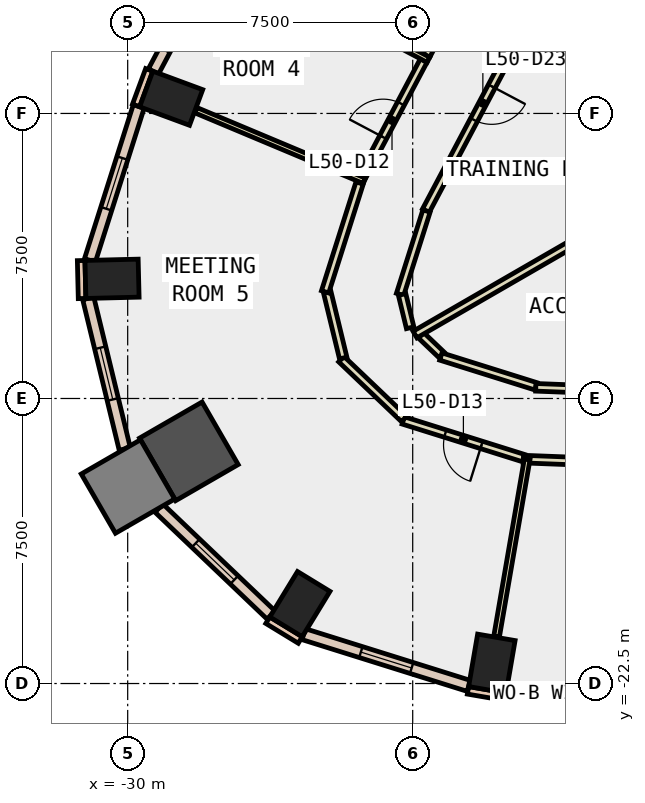
"""IFC4 building model, lengths in metres.
Left out: names, types, materials, properties, quantities, classifications, styles, units other than length and angle.
Written with IfcOpenShell. Run it as: python <this file> out.ifc"""

import sys

from ifc_helpers import new_model, si_unit, direction, frame, frame_2d, origin, origin_2d, place, context, subcontext, project, spatial, rectangle, extrude, element, fill, save


model = new_model("IFC4")
c1 = context("Model", 3, precision=1e-05, world=origin(), true_north=direction((0.0, 1.0)))
c2 = subcontext(c1, "Body", "Model", "MODEL_VIEW")
j1 = project(units=[si_unit("LENGTHUNIT", "METRE"), si_unit("PLANEANGLEUNIT", "RADIAN")], contexts=[c1])
p1 = place(None, origin())
s1 = spatial("IfcSite", under=j1, at=p1, CompositionType="ELEMENT")
p2 = place(p1, origin())
s2 = spatial("IfcBuilding", under=s1, at=p2, CompositionType="ELEMENT")
p3 = place(p2, frame((0.0, 0.0, 223.4)))
s3 = spatial("IfcBuildingStorey", under=s2, at=p3, CompositionType="ELEMENT", Elevation=223.4)
for number, where, z_axis, x_axis in (
    (1, (-20.417, -21.975, -0.4), (0.0, 0.0, 1.0), (-0.986, 0.169, 0.0)),
    (2, (-28.856, -7.1, -0.4), (0.0, 0.0, 1.0), (0.347, 0.938, 0.0)),
    (3, (-30.412, -11.851, -0.4), (0.0, 0.0, 1.0), (-0.025, 1.0, 0.0)),
):
    element("IfcColumn", number, at=place(p3, frame(where, z_axis=z_axis, x_axis=x_axis)), inside=s3, PredefinedType="COLUMN", context=c2, shape_type="SweptSolid", body=[
        extrude(rectangle(XDim=1.0, YDim=1.4, at=origin_2d()), origin(), (0.0, 0.0, 1.0), 4.2),
    ])
p4 = place(p3, frame((-28.39, -16.391, -0.4), z_axis=(0.0, 0.0, 1.0), x_axis=(0.866025403784, 0.5, 0.0)))
e4 = element("IfcColumn", 4, at=p4, inside=s3, PredefinedType="COLUMN", context=c2, shape_type="SweptSolid", body=[
    extrude(rectangle(XDim=1.9, YDim=1.9, at=origin_2d()), origin(), (0.0, 0.0, 1.0), 4.2),
])
p5 = place(p3, frame((-25.469, -20.412, -0.4), z_axis=(0.0, 0.0, 1.0), x_axis=(-0.853423465127, 0.521218178089, 0.0)))
e5 = element("IfcColumn", 5, at=p5, inside=s3, PredefinedType="COLUMN", context=c2, shape_type="SweptSolid", body=[
    extrude(rectangle(XDim=1.0, YDim=1.4, at=origin_2d()), origin(), (0.0, 0.0, 1.0), 4.2),
])
p6 = place(p3, frame((-29.992, -17.316, -0.4), z_axis=(0.0, 0.0, 1.0), x_axis=(0.866025403784, 0.5, 0.0)))
e6 = element("IfcColumn", 6, at=p6, inside=s3, PredefinedType="COLUMN", context=c2, shape_type="SweptSolid", body=[
    extrude(rectangle(XDim=1.8, YDim=1.8, at=origin_2d()), origin(), (0.0, 0.0, 1.0), 4.2),
])
p7 = place(p3, frame((-29.433, -6.354, 0.0), z_axis=(0.0, 0.0, 1.0), x_axis=(-0.346892928577, -0.937904737222, 0.0)))
e7 = element("IfcWall", 7, at=p7, inside=s3, PredefinedType="STANDARD", context=c2, shape_type="SweptSolid", body=[
    extrude(rectangle(XDim=1.0, YDim=0.2, at=frame_2d((0.5, 0.0))), origin(), (0.0, 0.0, 1.0), 3.8),
])
p8 = place(p3, frame((-21.045, -22.679, 0.0), z_axis=(0.0, 0.0, 1.0), x_axis=(0.985631544579, -0.168909615862, 0.0)))
e8 = element("IfcWall", 8, at=p8, inside=s3, PredefinedType="STANDARD", context=c2, shape_type="SweptSolid", body=[
    extrude(rectangle(XDim=1.0, YDim=0.2, at=frame_2d((0.5, 0.0))), origin(), (0.0, 0.0, 1.0), 3.8),
])
p9 = place(p3, frame((-31.224, -11.371, 0.0), z_axis=(0.0, 0.0, 1.0), x_axis=(0.024186470916, -0.999707464524, 0.0)))
e9 = element("IfcWall", 9, at=p9, inside=s3, PredefinedType="STANDARD", context=c2, shape_type="SweptSolid", body=[
    extrude(rectangle(XDim=0.999, YDim=0.2, at=frame_2d((0.5, 0.0))), origin(), (0.0, 0.0, 1.0), 3.8),
])
p10 = place(p3, frame((-26.313, -20.834, 0.0), z_axis=(0.0, 0.0, 1.0), x_axis=(0.853679739553, -0.520798331677, 0.0)))
e10 = element("IfcWall", 10, at=p10, inside=s3, PredefinedType="STANDARD", context=c2, shape_type="SweptSolid", body=[
    extrude(rectangle(XDim=1.0, YDim=0.2, at=frame_2d((0.5, 0.0))), origin(), (0.0, 0.0, 1.0), 3.8),
])
p11 = place(p3, frame((-20.04, -22.732, 0.0), z_axis=(0.0, 0.0, 1.0), x_axis=(0.99926218254, -0.038406907512, 0.0)))
e11 = element("IfcWall", 11, at=p11, inside=s3, PredefinedType="STANDARD", context=c2, shape_type="SweptSolid", body=[
    extrude(rectangle(XDim=5.365, YDim=0.3, at=frame_2d((2.683, 0.0))), origin(), (0.0, 0.0, 1.0), 3.8),
])
p12 = place(p11, frame((0.641, 0.0, 0.9)))
e12 = element("IfcOpeningElement", 12, at=p12, cuts=e11, PredefinedType="OPENING", context=c2, shape_type="SweptSolid", body=[
    extrude(rectangle(XDim=1.4, YDim=2.6, at=frame_2d((0.7, 1.3))), frame((0.0, 0.16, 0.0), z_axis=(0.0, -1.0, 0.0), x_axis=(1.0, 0.0, 0.0)), (0.0, 0.0, 1.0), 0.32),
])
p13 = place(p11, frame((3.324, 0.0, 0.9)))
e13 = element("IfcOpeningElement", 13, at=p13, cuts=e11, PredefinedType="OPENING", context=c2, shape_type="SweptSolid", body=[
    extrude(rectangle(XDim=1.4, YDim=2.6, at=frame_2d((0.7, 1.3))), frame((0.0, 0.16, 0.0), z_axis=(0.0, -1.0, 0.0), x_axis=(1.0, 0.0, 0.0)), (0.0, 0.0, 1.0), 0.32),
])
p14 = place(p3, frame((-25.887, 0.09, 0.0), z_axis=(0.0, 0.0, 1.0), x_axis=(-0.468020680141, -0.8837175131, 0.0)))
e14 = element("IfcWall", 14, at=p14, inside=s3, PredefinedType="STANDARD", context=c2, shape_type="SweptSolid", body=[
    extrude(rectangle(XDim=7.34, YDim=0.3, at=frame_2d((3.67, 0.0))), origin(), (0.0, 0.0, 1.0), 3.8),
])
p15 = place(p14, frame((0.635, 0.0, 0.9)))
e15 = element("IfcOpeningElement", 15, at=p15, cuts=e14, PredefinedType="OPENING", context=c2, shape_type="SweptSolid", body=[
    extrude(rectangle(XDim=2.4, YDim=2.6, at=frame_2d((1.2, 1.3))), frame((0.0, 0.16, 0.0), z_axis=(0.0, -1.0, 0.0), x_axis=(1.0, 0.0, 0.0)), (0.0, 0.0, 1.0), 0.32),
])
p16 = place(p14, frame((4.305, 0.0, 0.9)))
e16 = element("IfcOpeningElement", 16, at=p16, cuts=e14, PredefinedType="OPENING", context=c2, shape_type="SweptSolid", body=[
    extrude(rectangle(XDim=2.4, YDim=2.6, at=frame_2d((1.2, 1.3))), frame((0.0, 0.16, 0.0), z_axis=(0.0, -1.0, 0.0), x_axis=(1.0, 0.0, 0.0)), (0.0, 0.0, 1.0), 0.32),
])
p17 = place(p3, frame((-29.71, -7.316, 0.0), z_axis=(0.0, 0.0, 1.0), x_axis=(-0.302195467572, -0.953245980521, 0.0)))
e17 = element("IfcWall", 17, at=p17, inside=s3, PredefinedType="STANDARD", context=c2, shape_type="SweptSolid", body=[
    extrude(rectangle(XDim=4.249, YDim=0.3, at=frame_2d((2.125, 0.0))), origin(), (0.0, 0.0, 1.0), 3.8),
])
p18 = place(p17, frame((1.424, 0.0, 0.9)))
e18 = element("IfcOpeningElement", 18, at=p18, cuts=e17, PredefinedType="OPENING", context=c2, shape_type="SweptSolid", body=[
    extrude(rectangle(XDim=1.4, YDim=2.6, at=frame_2d((0.7, 1.3))), frame((0.0, 0.16, 0.0), z_axis=(0.0, -1.0, 0.0), x_axis=(1.0, 0.0, 0.0)), (0.0, 0.0, 1.0), 0.32),
])
p19 = place(p3, frame((-31.038, -12.365, 0.0), z_axis=(0.0, 0.0, 1.0), x_axis=(0.235766276378, -0.971809787419, 0.0)))
e19 = element("IfcWall", 19, at=p19, inside=s3, PredefinedType="STANDARD", context=c2, shape_type="SweptSolid", body=[
    extrude(rectangle(XDim=4.077, YDim=0.3, at=frame_2d((2.039, 0.0))), origin(), (0.0, 0.0, 1.0), 3.8),
])
p20 = place(p19, frame((1.338, 0.0, 0.9)))
e20 = element("IfcOpeningElement", 20, at=p20, cuts=e19, PredefinedType="OPENING", context=c2, shape_type="SweptSolid", body=[
    extrude(rectangle(XDim=1.4, YDim=2.6, at=frame_2d((0.7, 1.3))), frame((0.0, 0.16, 0.0), z_axis=(0.0, -1.0, 0.0), x_axis=(1.0, 0.0, 0.0)), (0.0, 0.0, 1.0), 0.32),
])
p21 = place(p3, frame((-29.178, -17.884, 0.0), z_axis=(0.0, 0.0, 1.0), x_axis=(0.723707630873, -0.69010670553, 0.0)))
e21 = element("IfcWall", 21, at=p21, inside=s3, PredefinedType="STANDARD", context=c2, shape_type="SweptSolid", body=[
    extrude(rectangle(XDim=4.076, YDim=0.3, at=frame_2d((2.038, 0.0))), origin(), (0.0, 0.0, 1.0), 3.8),
])
p22 = place(p21, frame((1.338, 0.0, 0.9)))
e22 = element("IfcOpeningElement", 22, at=p22, cuts=e21, PredefinedType="OPENING", context=c2, shape_type="SweptSolid", body=[
    extrude(rectangle(XDim=1.4, YDim=2.6, at=frame_2d((0.7, 1.3))), frame((0.0, 0.16, 0.0), z_axis=(0.0, -1.0, 0.0), x_axis=(1.0, 0.0, 0.0)), (0.0, 0.0, 1.0), 0.32),
])
p23 = place(p3, frame((-25.367, -21.202, 0.0), z_axis=(0.0, 0.0, 1.0), x_axis=(0.954297481837, -0.298858354675, 0.0)))
e23 = element("IfcWall", 23, at=p23, inside=s3, PredefinedType="STANDARD", context=c2, shape_type="SweptSolid", body=[
    extrude(rectangle(XDim=4.551, YDim=0.3, at=frame_2d((2.275, 0.0))), origin(), (0.0, 0.0, 1.0), 3.8),
])
p24 = place(p23, frame((1.575, 0.0, 0.9)))
e24 = element("IfcOpeningElement", 24, at=p24, cuts=e23, PredefinedType="OPENING", context=c2, shape_type="SweptSolid", body=[
    extrude(rectangle(XDim=1.4, YDim=2.6, at=frame_2d((0.7, 1.3))), frame((0.0, 0.16, 0.0), z_axis=(0.0, -1.0, 0.0), x_axis=(1.0, 0.0, 0.0)), (0.0, 0.0, 1.0), 0.32),
])
p25 = place(p3, frame((-19.154, -4.397, 0.0), z_axis=(0.0, 0.0, 1.0), x_axis=(-0.468118749105, -0.883665568378, 0.0)))
e25 = element("IfcWall", 25, at=p25, inside=s3, PredefinedType="PARTITIONING", context=c2, shape_type="SweptSolid", body=[
    extrude(rectangle(XDim=6.409, YDim=0.2, at=frame_2d((3.204, 0.0))), origin(), (0.0, 0.0, 1.0), 3.8),
])
p26 = place(p25, frame((2.704, 0.0, 0.0)))
e26 = element("IfcOpeningElement", 26, at=p26, cuts=e25, PredefinedType="OPENING", context=c2, shape_type="SweptSolid", body=[
    extrude(rectangle(XDim=1.0, YDim=2.1, at=frame_2d((0.5, 1.05))), frame((0.0, 0.11, 0.0), z_axis=(0.0, -1.0, 0.0), x_axis=(1.0, 0.0, 0.0)), (0.0, 0.0, 1.0), 0.22),
])
p27 = place(p3, frame((-22.137, -10.067, 0.0), z_axis=(0.0, 0.0, 1.0), x_axis=(-0.302262657712, -0.953224677478, 0.0)))
e27 = element("IfcWall", 27, at=p27, inside=s3, PredefinedType="PARTITIONING", context=c2, shape_type="SweptSolid", body=[
    extrude(rectangle(XDim=2.303, YDim=0.2, at=frame_2d((1.151, 0.0))), origin(), (0.0, 0.0, 1.0), 3.8),
])
p28 = place(p3, frame((-22.779, -12.264, 0.0), z_axis=(0.0, 0.0, 1.0), x_axis=(0.2356388299, -0.971840697771, 0.0)))
e28 = element("IfcWall", 28, at=p28, inside=s3, PredefinedType="PARTITIONING", context=c2, shape_type="SweptSolid", body=[
    extrude(rectangle(XDim=0.9, YDim=0.2, at=frame_2d((0.45, 0.0))), origin(), (0.0, 0.0, 1.0), 3.8),
])
p29 = place(p3, frame((-22.281, -13.337, 0.0), z_axis=(0.0, 0.0, 1.0), x_axis=(0.723443840005, -0.690383234413, 0.0)))
e29 = element("IfcWall", 29, at=p29, inside=s3, PredefinedType="PARTITIONING", context=c2, shape_type="SweptSolid", body=[
    extrude(rectangle(XDim=0.753, YDim=0.2, at=frame_2d((0.376, 0.0))), origin(), (0.0, 0.0, 1.0), 3.8),
])
p30 = place(p3, frame((-21.759, -13.896, 0.0), z_axis=(0.0, 0.0, 1.0), x_axis=(0.954254371194, -0.298995978328, 0.0)))
e30 = element("IfcWall", 30, at=p30, inside=s3, PredefinedType="PARTITIONING", context=c2, shape_type="SweptSolid", body=[
    extrude(rectangle(XDim=2.622, YDim=0.2, at=frame_2d((1.311, 0.0))), origin(), (0.0, 0.0, 1.0), 3.8),
])
p31 = place(p3, frame((-19.261, -14.706, 0.0), z_axis=(0.0, 0.0, 1.0), x_axis=(0.999262930749, -0.038387435847, 0.0)))
e31 = element("IfcWall", 31, at=p31, inside=s3, PredefinedType="PARTITIONING", context=c2, shape_type="SweptSolid", body=[
    extrude(rectangle(XDim=5.336, YDim=0.2, at=frame_2d((2.668, 0.0))), origin(), (0.0, 0.0, 1.0), 3.8),
])
p32 = place(p31, frame((2.168, 0.0, 0.0)))
e32 = element("IfcOpeningElement", 32, at=p32, cuts=e31, PredefinedType="OPENING", context=c2, shape_type="SweptSolid", body=[
    extrude(rectangle(XDim=1.0, YDim=2.1, at=frame_2d((0.5, 1.05))), frame((0.0, 0.11, 0.0), z_axis=(0.0, -1.0, 0.0), x_axis=(1.0, 0.0, 0.0)), (0.0, 0.0, 1.0), 0.22),
])
p33 = place(p3, frame((-22.14, -5.976, 0.0), z_axis=(0.0, 0.0, 1.0), x_axis=(0.467979143965, 0.883739509592, 0.0)))
e33 = element("IfcWall", 33, at=p33, inside=s3, PredefinedType="PARTITIONING", context=c2, shape_type="SweptSolid", body=[
    extrude(rectangle(XDim=4.049, YDim=0.2, at=frame_2d((2.024, 0.0))), origin(), (0.0, 0.0, 1.0), 3.8),
])
p34 = place(p33, frame((1.524, 0.0, 0.0)))
e34 = element("IfcOpeningElement", 34, at=p34, cuts=e33, PredefinedType="OPENING", context=c2, shape_type="SweptSolid", body=[
    extrude(rectangle(XDim=1.0, YDim=2.1, at=frame_2d((0.5, 1.05))), frame((0.0, 0.11, 0.0), z_axis=(0.0, -1.0, 0.0), x_axis=(1.0, 0.0, 0.0)), (0.0, 0.0, 1.0), 0.22),
])
p35 = place(p3, frame((-23.878, -9.256, 0.0), z_axis=(0.0, 0.0, 1.0), x_axis=(0.46795384568, 0.883752905689, 0.0)))
e35 = element("IfcWall", 35, at=p35, inside=s3, PredefinedType="PARTITIONING", context=c2, shape_type="SweptSolid", body=[
    extrude(rectangle(XDim=3.562, YDim=0.2, at=frame_2d((1.781, 0.0))), origin(), (0.0, 0.0, 1.0), 3.8),
])
p36 = place(p35, frame((1.281, 0.0, 0.0)))
e36 = element("IfcOpeningElement", 36, at=p36, cuts=e35, PredefinedType="OPENING", context=c2, shape_type="SweptSolid", body=[
    extrude(rectangle(XDim=1.0, YDim=2.1, at=frame_2d((0.5, 1.05))), frame((0.0, 0.11, 0.0), z_axis=(0.0, -1.0, 0.0), x_axis=(1.0, 0.0, 0.0)), (0.0, 0.0, 1.0), 0.22),
])
p37 = place(p3, frame((-19.583, -16.569, 0.0), z_axis=(0.0, 0.0, 1.0), x_axis=(-0.954238750745, 0.299045826884, 0.0)))
e37 = element("IfcWall", 37, at=p37, inside=s3, PredefinedType="PARTITIONING", context=c2, shape_type="SweptSolid", body=[
    extrude(rectangle(XDim=3.318, YDim=0.2, at=frame_2d((1.659, 0.0))), origin(), (0.0, 0.0, 1.0), 3.8),
])
p38 = place(p37, frame((1.159, 0.0, 0.0)))
e38 = element("IfcOpeningElement", 38, at=p38, cuts=e37, PredefinedType="OPENING", context=c2, shape_type="SweptSolid", body=[
    extrude(rectangle(XDim=1.0, YDim=2.1, at=frame_2d((0.5, 1.05))), frame((0.0, 0.11, 0.0), z_axis=(0.0, -1.0, 0.0), x_axis=(1.0, 0.0, 0.0)), (0.0, 0.0, 1.0), 0.22),
])
p39 = place(p3, frame((-22.726, -15.538, 0.0), z_axis=(0.0, 0.0, 1.0), x_axis=(-0.723967420116, 0.689834164571, 0.0)))
e39 = element("IfcWall", 39, at=p39, inside=s3, PredefinedType="PARTITIONING", context=c2, shape_type="SweptSolid", body=[
    extrude(rectangle(XDim=2.282, YDim=0.2, at=frame_2d((1.141, 0.0))), origin(), (0.0, 0.0, 1.0), 3.8),
])
p40 = place(p3, frame((-24.329, -13.935, 0.0), z_axis=(0.0, 0.0, 1.0), x_axis=(-0.235756216468, 0.971812227952, 0.0)))
e40 = element("IfcWall", 40, at=p40, inside=s3, PredefinedType="PARTITIONING", context=c2, shape_type="SweptSolid", body=[
    extrude(rectangle(XDim=1.79, YDim=0.2, at=frame_2d((0.895, 0.0))), origin(), (0.0, 0.0, 1.0), 3.8),
])
p41 = place(p3, frame((-24.805, -12.194, 0.0), z_axis=(0.0, 0.0, 1.0), x_axis=(0.302200639646, 0.953244340868, 0.0)))
e41 = element("IfcWall", 41, at=p41, inside=s3, PredefinedType="PARTITIONING", context=c2, shape_type="SweptSolid", body=[
    extrude(rectangle(XDim=3.004, YDim=0.2, at=frame_2d((1.502, 0.0))), origin(), (0.0, 0.0, 1.0), 3.8),
])
p42 = place(p3, frame((-13.988, -16.81, 0.0), z_axis=(0.0, 0.0, 1.0), x_axis=(-0.999263168163, 0.038381255227, 0.0)))
e42 = element("IfcWall", 42, at=p42, inside=s3, PredefinedType="PARTITIONING", context=c2, shape_type="SweptSolid", body=[
    extrude(rectangle(XDim=5.604, YDim=0.2, at=frame_2d((2.802, 0.0))), origin(), (0.0, 0.0, 1.0), 3.8),
])
p43 = place(p42, frame((2.302, 0.0, 0.0)))
e43 = element("IfcOpeningElement", 43, at=p43, cuts=e42, PredefinedType="OPENING", context=c2, shape_type="SweptSolid", body=[
    extrude(rectangle(XDim=1.0, YDim=2.1, at=frame_2d((0.5, 1.05))), frame((0.0, 0.11, 0.0), z_axis=(0.0, -1.0, 0.0), x_axis=(1.0, 0.0, 0.0)), (0.0, 0.0, 1.0), 0.22),
])
p44 = place(p3, frame((-16.525, -9.079, 0.0), z_axis=(0.0, 0.0, 1.0), x_axis=(-0.499943228252, 0.866058178487, 0.0)))
e44 = element("IfcWall", 44, at=p44, inside=s3, PredefinedType="PARTITIONING", context=c2, shape_type="SweptSolid", body=[
    extrude(rectangle(XDim=5.329, YDim=0.15, at=frame_2d((2.664, 0.0))), origin(), (0.0, 0.0, 1.0), 3.8),
])
p45 = place(p3, frame((-16.514, -9.897, 0.0), z_axis=(0.0, 0.0, 1.0), x_axis=(-0.866041209536, -0.499972622635, 0.0)))
e45 = element("IfcWall", 45, at=p45, inside=s3, PredefinedType="PARTITIONING", context=c2, shape_type="SweptSolid", body=[
    extrude(rectangle(XDim=6.843, YDim=0.2, at=frame_2d((3.421, 0.0))), origin(), (0.0, 0.0, 1.0), 3.8),
])
p46 = place(p3, frame((-22.087, -6.089, 0.0), z_axis=(0.0, 0.0, 1.0), x_axis=(-0.883611647524, 0.468220521079, 0.0)))
e46 = element("IfcWall", 46, at=p46, inside=s3, PredefinedType="PARTITIONING", context=c2, shape_type="SweptSolid", body=[
    extrude(rectangle(XDim=6.1, YDim=0.15, at=frame_2d((3.05, 0.0))), origin(), (0.0, 0.0, 1.0), 3.8),
])
p47 = place(p3, frame((-23.774, -9.273, 0.0), z_axis=(0.0, 0.0, 1.0), x_axis=(-0.922217762148, 0.386670918454, 0.0)))
e47 = element("IfcWall", 47, at=p47, inside=s3, PredefinedType="PARTITIONING", context=c2, shape_type="SweptSolid", body=[
    extrude(rectangle(XDim=4.805, YDim=0.15, at=frame_2d((2.402, 0.0))), origin(), (0.0, 0.0, 1.0), 3.8),
])
p48 = place(p3, frame((-19.488, -16.599, 0.0), z_axis=(0.0, 0.0, 1.0), x_axis=(-0.169963884325, -0.985450292011, 0.0)))
e48 = element("IfcWall", 48, at=p48, inside=s3, PredefinedType="PARTITIONING", context=c2, shape_type="SweptSolid", body=[
    extrude(rectangle(XDim=4.736, YDim=0.15, at=frame_2d((2.368, 0.0))), origin(), (0.0, 0.0, 1.0), 3.8),
])
p49 = place(p12, origin())
e49 = element("IfcWindow", 49, at=p49, inside=s3, PartitioningType="SINGLE_PANEL", PredefinedType="WINDOW", context=c2, shape_type="SweptSolid", body=[
    extrude(rectangle(XDim=1.4, YDim=2.6, at=frame_2d((0.7, 1.3))), frame((0.0, 0.03, 0.0), z_axis=(0.0, -1.0, 0.0), x_axis=(1.0, 0.0, 0.0)), (0.0, 0.0, 1.0), 0.06),
])
fill(e12, e49)
p50 = place(p18, origin())
e50 = element("IfcWindow", 50, at=p50, inside=s3, PartitioningType="SINGLE_PANEL", PredefinedType="WINDOW", context=c2, shape_type="SweptSolid", body=[
    extrude(rectangle(XDim=1.4, YDim=2.6, at=frame_2d((0.7, 1.3))), frame((0.0, 0.03, 0.0), z_axis=(0.0, -1.0, 0.0), x_axis=(1.0, 0.0, 0.0)), (0.0, 0.0, 1.0), 0.06),
])
fill(e18, e50)
p51 = place(p20, origin())
e51 = element("IfcWindow", 51, at=p51, inside=s3, PartitioningType="SINGLE_PANEL", PredefinedType="WINDOW", context=c2, shape_type="SweptSolid", body=[
    extrude(rectangle(XDim=1.4, YDim=2.6, at=frame_2d((0.7, 1.3))), frame((0.0, 0.03, 0.0), z_axis=(0.0, -1.0, 0.0), x_axis=(1.0, 0.0, 0.0)), (0.0, 0.0, 1.0), 0.06),
])
fill(e20, e51)
p52 = place(p22, origin())
e52 = element("IfcWindow", 52, at=p52, inside=s3, PartitioningType="SINGLE_PANEL", PredefinedType="WINDOW", context=c2, shape_type="SweptSolid", body=[
    extrude(rectangle(XDim=1.4, YDim=2.6, at=frame_2d((0.7, 1.3))), frame((0.0, 0.03, 0.0), z_axis=(0.0, -1.0, 0.0), x_axis=(1.0, 0.0, 0.0)), (0.0, 0.0, 1.0), 0.06),
])
fill(e22, e52)
p53 = place(p24, origin())
e53 = element("IfcWindow", 53, at=p53, inside=s3, PartitioningType="SINGLE_PANEL", PredefinedType="WINDOW", context=c2, shape_type="SweptSolid", body=[
    extrude(rectangle(XDim=1.4, YDim=2.6, at=frame_2d((0.7, 1.3))), frame((0.0, 0.03, 0.0), z_axis=(0.0, -1.0, 0.0), x_axis=(1.0, 0.0, 0.0)), (0.0, 0.0, 1.0), 0.06),
])
fill(e24, e53)
p54 = place(p36, origin())
e54 = element("IfcDoor", 54, at=p54, inside=s3, OperationType="SINGLE_SWING_LEFT", PredefinedType="DOOR", context=c2, shape_type="SweptSolid", body=[
    extrude(rectangle(XDim=1.0, YDim=2.1, at=frame_2d((0.5, 1.05))), frame((0.0, 0.025, 0.0), z_axis=(0.0, -1.0, 0.0), x_axis=(1.0, 0.0, 0.0)), (0.0, 0.0, 1.0), 0.05),
])
fill(e36, e54)
p55 = place(p38, origin())
e55 = element("IfcDoor", 55, at=p55, inside=s3, OperationType="SINGLE_SWING_RIGHT", PredefinedType="DOOR", context=c2, shape_type="SweptSolid", body=[
    extrude(rectangle(XDim=1.0, YDim=2.1, at=frame_2d((0.5, 1.05))), frame((0.0, 0.025, 0.0), z_axis=(0.0, -1.0, 0.0), x_axis=(1.0, 0.0, 0.0)), (0.0, 0.0, 1.0), 0.05),
])
fill(e38, e55)
p56 = place(p26, origin())
e56 = element("IfcDoor", 56, at=p56, inside=s3, OperationType="SINGLE_SWING_LEFT", PredefinedType="DOOR", context=c2, shape_type="SweptSolid", body=[
    extrude(rectangle(XDim=1.0, YDim=2.1, at=frame_2d((0.5, 1.05))), frame((0.0, 0.025, 0.0), z_axis=(0.0, -1.0, 0.0), x_axis=(1.0, 0.0, 0.0)), (0.0, 0.0, 1.0), 0.05),
])
fill(e26, e56)
save(model, sys.argv[1])
